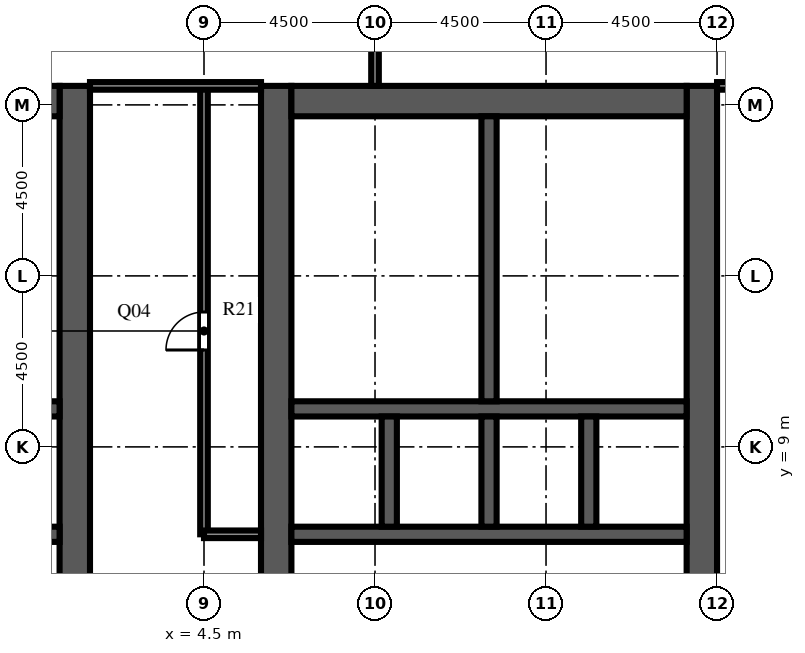
"""IFC4 building model, lengths in metres.
Left out: names, types, materials, properties, quantities, classifications, styles, units other than length and angle.
Written with IfcOpenShell. Run it as: python <this file> out.ifc"""

import sys

from ifc_helpers import new_model, si_unit, direction, frame, frame_2d, origin, place, context, subcontext, project, spatial, rectangle, extrude, element, fill, save


model = new_model("IFC4")
c1 = context("Model", 3, precision=1e-05, world=origin(), true_north=direction((0.0, 1.0)))
c2 = subcontext(c1, "Body", "Model", "MODEL_VIEW")
j1 = project(units=[si_unit("LENGTHUNIT", "METRE"), si_unit("PLANEANGLEUNIT", "RADIAN")], contexts=[c1])
p1 = place(None, origin())
s1 = spatial("IfcSite", under=j1, at=p1, CompositionType="ELEMENT")
p2 = place(p1, origin())
s2 = spatial("IfcBuilding", under=s1, at=p2, CompositionType="ELEMENT")
p3 = place(p2, frame((0.0, 0.0, 220.2)))
s3 = spatial("IfcBuildingStorey", under=s2, at=p3, CompositionType="ELEMENT", Elevation=220.2)
p4 = place(p3, frame((1.1, -9.0, 0.0), z_axis=(0.0, 0.0, 1.0), x_axis=(0.0, 1.0, 0.0)))
e1 = element("IfcWall", 1, at=p4, inside=s3, PredefinedType="SHEAR", context=c2, shape_type="SweptSolid", body=[
    extrude(rectangle(XDim=27.5, YDim=0.8, at=frame_2d((13.75, 0.0))), origin(), (0.0, 0.0, 1.0), 6.0),
])
p5 = place(p4, frame((12.55, 0.0, 0.0)))
e2 = element("IfcOpeningElement", 2, at=p5, cuts=e1, PredefinedType="OPENING", context=c2, shape_type="SweptSolid", body=[
    extrude(rectangle(XDim=2.4, YDim=2.4, at=frame_2d((1.2, 1.2))), frame((0.0, 0.41, 0.0), z_axis=(0.0, -1.0, 0.0), x_axis=(1.0, 0.0, 0.0)), (0.0, 0.0, 1.0), 0.82),
])
p6 = place(p4, frame((5.5, 0.0, 0.0)))
e3 = element("IfcOpeningElement", 3, at=p6, cuts=e1, PredefinedType="OPENING", context=c2, shape_type="SweptSolid", body=[
    extrude(rectangle(XDim=0.95, YDim=2.1, at=frame_2d((0.475, 1.05))), frame((0.0, 0.41, 0.0), z_axis=(0.0, -1.0, 0.0), x_axis=(1.0, 0.0, 0.0)), (0.0, 0.0, 1.0), 0.82),
])
p7 = place(p4, frame((23.475, 0.0, 0.0)))
e4 = element("IfcOpeningElement", 4, at=p7, cuts=e1, PredefinedType="OPENING", context=c2, shape_type="SweptSolid", body=[
    extrude(rectangle(XDim=1.2, YDim=2.1, at=frame_2d((0.6, 1.05))), frame((0.0, 0.41, 0.0), z_axis=(0.0, -1.0, 0.0), x_axis=(1.0, 0.0, 0.0)), (0.0, 0.0, 1.0), 0.82),
])
p8 = place(p3, frame((-9.7, 18.1, 0.0), z_axis=(0.0, 0.0, 1.0), x_axis=(1.0, 0.0, 0.0)))
e5 = element("IfcWall", 5, at=p8, inside=s3, PredefinedType="SHEAR", context=c2, shape_type="SweptSolid", body=[
    extrude(rectangle(XDim=10.4, YDim=0.8, at=frame_2d((5.2, 0.0))), origin(), (0.0, 0.0, 1.0), 6.0),
])
p9 = place(p3, frame((-9.7, 6.7, 0.0), z_axis=(0.0, 0.0, 1.0), x_axis=(1.0, 0.0, 0.0)))
e6 = element("IfcWall", 6, at=p9, inside=s3, PredefinedType="SHEAR", context=c2, shape_type="SweptSolid", body=[
    extrude(rectangle(XDim=10.4, YDim=0.4, at=frame_2d((5.2, 0.0))), origin(), (0.0, 0.0, 1.0), 6.0),
])
p10 = place(p9, frame((3.337, 0.0, 0.0)))
e7 = element("IfcOpeningElement", 7, at=p10, cuts=e6, PredefinedType="OPENING", context=c2, shape_type="SweptSolid", body=[
    extrude(rectangle(XDim=1.1, YDim=2.1, at=frame_2d((0.55, 1.05))), frame((0.0, 0.21, 0.0), z_axis=(0.0, -1.0, 0.0), x_axis=(1.0, 0.0, 0.0)), (0.0, 0.0, 1.0), 0.42),
])
p11 = place(p9, frame((5.962, 0.0, 0.0)))
e8 = element("IfcOpeningElement", 8, at=p11, cuts=e6, PredefinedType="OPENING", context=c2, shape_type="SweptSolid", body=[
    extrude(rectangle(XDim=1.1, YDim=2.1, at=frame_2d((0.55, 1.05))), frame((0.0, 0.21, 0.0), z_axis=(0.0, -1.0, 0.0), x_axis=(1.0, 0.0, 0.0)), (0.0, 0.0, 1.0), 0.42),
])
p12 = place(p9, frame((8.663, 0.0, 0.0)))
e9 = element("IfcOpeningElement", 9, at=p12, cuts=e6, PredefinedType="OPENING", context=c2, shape_type="SweptSolid", body=[
    extrude(rectangle(XDim=1.1, YDim=2.1, at=frame_2d((0.55, 1.05))), frame((0.0, 0.21, 0.0), z_axis=(0.0, -1.0, 0.0), x_axis=(1.0, 0.0, 0.0)), (0.0, 0.0, 1.0), 0.42),
])
p13 = place(p9, frame((0.688, 0.0, 0.0)))
e10 = element("IfcOpeningElement", 10, at=p13, cuts=e6, PredefinedType="OPENING", context=c2, shape_type="SweptSolid", body=[
    extrude(rectangle(XDim=1.0, YDim=2.1, at=frame_2d((0.5, 1.05))), frame((0.0, 0.21, 0.0), z_axis=(0.0, -1.0, 0.0), x_axis=(1.0, 0.0, 0.0)), (0.0, 0.0, 1.0), 0.42),
])
p14 = place(p3, frame((-9.7, 10.0, 0.0), z_axis=(0.0, 0.0, 1.0), x_axis=(1.0, 0.0, 0.0)))
e11 = element("IfcWall", 11, at=p14, inside=s3, PredefinedType="SHEAR", context=c2, shape_type="SweptSolid", body=[
    extrude(rectangle(XDim=10.4, YDim=0.4, at=frame_2d((5.2, 0.0))), origin(), (0.0, 0.0, 1.0), 6.0),
])
p15 = place(p3, frame((6.4, -9.0, 0.0), z_axis=(0.0, 0.0, 1.0), x_axis=(0.0, 1.0, 0.0)))
e12 = element("IfcWall", 12, at=p15, inside=s3, PredefinedType="SHEAR", context=c2, shape_type="SweptSolid", body=[
    extrude(rectangle(XDim=27.5, YDim=0.8, at=frame_2d((13.75, 0.0))), origin(), (0.0, 0.0, 1.0), 6.0),
])
p16 = place(p15, frame((12.55, 0.0, 0.0)))
e13 = element("IfcOpeningElement", 13, at=p16, cuts=e12, PredefinedType="OPENING", context=c2, shape_type="SweptSolid", body=[
    extrude(rectangle(XDim=2.4, YDim=2.4, at=frame_2d((1.2, 1.2))), frame((0.0, 0.41, 0.0), z_axis=(0.0, -1.0, 0.0), x_axis=(1.0, 0.0, 0.0)), (0.0, 0.0, 1.0), 0.82),
])
p17 = place(p15, frame((5.5, 0.0, 0.0)))
e14 = element("IfcOpeningElement", 14, at=p17, cuts=e12, PredefinedType="OPENING", context=c2, shape_type="SweptSolid", body=[
    extrude(rectangle(XDim=0.95, YDim=2.1, at=frame_2d((0.475, 1.05))), frame((0.0, 0.41, 0.0), z_axis=(0.0, -1.0, 0.0), x_axis=(1.0, 0.0, 0.0)), (0.0, 0.0, 1.0), 0.82),
])
p18 = place(p15, frame((23.475, 0.0, 0.0)))
e15 = element("IfcOpeningElement", 15, at=p18, cuts=e12, PredefinedType="OPENING", context=c2, shape_type="SweptSolid", body=[
    extrude(rectangle(XDim=1.2, YDim=2.1, at=frame_2d((0.6, 1.05))), frame((0.0, 0.41, 0.0), z_axis=(0.0, -1.0, 0.0), x_axis=(1.0, 0.0, 0.0)), (0.0, 0.0, 1.0), 0.82),
])
p19 = place(p3, frame((17.6, -9.0, 0.0), z_axis=(0.0, 0.0, 1.0), x_axis=(0.0, 1.0, 0.0)))
e16 = element("IfcWall", 16, at=p19, inside=s3, PredefinedType="SHEAR", context=c2, shape_type="SweptSolid", body=[
    extrude(rectangle(XDim=27.5, YDim=0.8, at=frame_2d((13.75, 0.0))), origin(), (0.0, 0.0, 1.0), 6.0),
])
p20 = place(p19, frame((12.55, 0.0, 0.0)))
e17 = element("IfcOpeningElement", 17, at=p20, cuts=e16, PredefinedType="OPENING", context=c2, shape_type="SweptSolid", body=[
    extrude(rectangle(XDim=2.4, YDim=2.4, at=frame_2d((1.2, 1.2))), frame((0.0, 0.41, 0.0), z_axis=(0.0, -1.0, 0.0), x_axis=(1.0, 0.0, 0.0)), (0.0, 0.0, 1.0), 0.82),
])
p21 = place(p19, frame((6.825, 0.0, 0.0)))
e18 = element("IfcOpeningElement", 18, at=p21, cuts=e16, PredefinedType="OPENING", context=c2, shape_type="SweptSolid", body=[
    extrude(rectangle(XDim=1.2, YDim=2.1, at=frame_2d((0.6, 1.05))), frame((0.0, 0.41, 0.0), z_axis=(0.0, -1.0, 0.0), x_axis=(1.0, 0.0, 0.0)), (0.0, 0.0, 1.0), 0.82),
])
p22 = place(p19, frame((19.475, 0.0, 0.0)))
e19 = element("IfcOpeningElement", 19, at=p22, cuts=e16, PredefinedType="OPENING", context=c2, shape_type="SweptSolid", body=[
    extrude(rectangle(XDim=1.2, YDim=2.1, at=frame_2d((0.6, 1.05))), frame((0.0, 0.41, 0.0), z_axis=(0.0, -1.0, 0.0), x_axis=(1.0, 0.0, 0.0)), (0.0, 0.0, 1.0), 0.82),
])
p23 = place(p3, frame((6.8, 18.1, 0.0), z_axis=(0.0, 0.0, 1.0), x_axis=(1.0, 0.0, 0.0)))
e20 = element("IfcWall", 20, at=p23, inside=s3, PredefinedType="SHEAR", context=c2, shape_type="SweptSolid", body=[
    extrude(rectangle(XDim=10.4, YDim=0.8, at=frame_2d((5.2, 0.0))), origin(), (0.0, 0.0, 1.0), 6.0),
])
p24 = place(p3, frame((6.8, 6.7, 0.0), z_axis=(0.0, 0.0, 1.0), x_axis=(1.0, 0.0, 0.0)))
e21 = element("IfcWall", 21, at=p24, inside=s3, PredefinedType="SHEAR", context=c2, shape_type="SweptSolid", body=[
    extrude(rectangle(XDim=10.4, YDim=0.4, at=frame_2d((5.2, 0.0))), origin(), (0.0, 0.0, 1.0), 6.0),
])
p25 = place(p24, frame((3.337, 0.0, 0.0)))
e22 = element("IfcOpeningElement", 22, at=p25, cuts=e21, PredefinedType="OPENING", context=c2, shape_type="SweptSolid", body=[
    extrude(rectangle(XDim=1.1, YDim=2.1, at=frame_2d((0.55, 1.05))), frame((0.0, 0.21, 0.0), z_axis=(0.0, -1.0, 0.0), x_axis=(1.0, 0.0, 0.0)), (0.0, 0.0, 1.0), 0.42),
])
p26 = place(p24, frame((5.962, 0.0, 0.0)))
e23 = element("IfcOpeningElement", 23, at=p26, cuts=e21, PredefinedType="OPENING", context=c2, shape_type="SweptSolid", body=[
    extrude(rectangle(XDim=1.1, YDim=2.1, at=frame_2d((0.55, 1.05))), frame((0.0, 0.21, 0.0), z_axis=(0.0, -1.0, 0.0), x_axis=(1.0, 0.0, 0.0)), (0.0, 0.0, 1.0), 0.42),
])
p27 = place(p24, frame((8.663, 0.0, 0.0)))
e24 = element("IfcOpeningElement", 24, at=p27, cuts=e21, PredefinedType="OPENING", context=c2, shape_type="SweptSolid", body=[
    extrude(rectangle(XDim=1.1, YDim=2.1, at=frame_2d((0.55, 1.05))), frame((0.0, 0.21, 0.0), z_axis=(0.0, -1.0, 0.0), x_axis=(1.0, 0.0, 0.0)), (0.0, 0.0, 1.0), 0.42),
])
p28 = place(p24, frame((0.688, 0.0, 0.0)))
e25 = element("IfcOpeningElement", 25, at=p28, cuts=e21, PredefinedType="OPENING", context=c2, shape_type="SweptSolid", body=[
    extrude(rectangle(XDim=1.0, YDim=2.1, at=frame_2d((0.5, 1.05))), frame((0.0, 0.21, 0.0), z_axis=(0.0, -1.0, 0.0), x_axis=(1.0, 0.0, 0.0)), (0.0, 0.0, 1.0), 0.42),
])
p29 = place(p3, frame((6.8, 10.0, 0.0), z_axis=(0.0, 0.0, 1.0), x_axis=(1.0, 0.0, 0.0)))
e26 = element("IfcWall", 26, at=p29, inside=s3, PredefinedType="SHEAR", context=c2, shape_type="SweptSolid", body=[
    extrude(rectangle(XDim=10.4, YDim=0.4, at=frame_2d((5.2, 0.0))), origin(), (0.0, 0.0, 1.0), 6.0),
])
for number, where, z_axis, x_axis in (
    (27, (9.375, 6.9, 0.0), (0.0, 0.0, 1.0), (0.0, 1.0, 0.0)),
    (28, (12.0, 6.9, 0.0), (0.0, 0.0, 1.0), (0.0, 1.0, 0.0)),
    (29, (14.625, 6.9, 0.0), (0.0, 0.0, 1.0), (0.0, 1.0, 0.0)),
):
    element("IfcWall", number, at=place(p3, frame(where, z_axis=z_axis, x_axis=x_axis)), inside=s3, PredefinedType="SHEAR", context=c2, shape_type="SweptSolid", body=[
        extrude(rectangle(XDim=2.9, YDim=0.4, at=frame_2d((1.45, 0.0))), origin(), (0.0, 0.0, 1.0), 6.0),
    ])
p30 = place(p3, frame((12.0, 10.2, 0.0), z_axis=(0.0, 0.0, 1.0), x_axis=(0.0, 1.0, 0.0)))
e30 = element("IfcWall", 30, at=p30, inside=s3, PredefinedType="SHEAR", context=c2, shape_type="SweptSolid", body=[
    extrude(rectangle(XDim=7.5, YDim=0.4, at=frame_2d((3.75, 0.0))), origin(), (0.0, 0.0, 1.0), 6.0),
])
p31 = place(p3, frame((-0.6, 12.45, 0.0), z_axis=(0.0, 0.0, 1.0), x_axis=(1.0, 0.0, 0.0)))
e31 = element("IfcWall", 31, at=p31, inside=s3, PredefinedType="PARTITIONING", context=c2, shape_type="SweptSolid", body=[
    extrude(rectangle(XDim=1.3, YDim=0.1, at=frame_2d((0.65, 0.0))), origin(), (0.0, 0.0, 1.0), 5.4),
])
p32 = place(p31, frame((0.2, 0.0, 0.0)))
e32 = element("IfcOpeningElement", 32, at=p32, cuts=e31, PredefinedType="OPENING", context=c2, shape_type="SweptSolid", body=[
    extrude(rectangle(XDim=0.9, YDim=2.1, at=frame_2d((0.45, 1.05))), frame((0.0, 0.06, 0.0), z_axis=(0.0, -1.0, 0.0), x_axis=(1.0, 0.0, 0.0)), (0.0, 0.0, 1.0), 0.12),
])
p33 = place(p3, frame((6.8, 12.45, 0.0), z_axis=(0.0, 0.0, 1.0), x_axis=(1.0, 0.0, 0.0)))
e33 = element("IfcWall", 33, at=p33, inside=s3, PredefinedType="PARTITIONING", context=c2, shape_type="SweptSolid", body=[
    extrude(rectangle(XDim=1.3, YDim=0.1, at=frame_2d((0.65, 0.0))), origin(), (0.0, 0.0, 1.0), 5.4),
])
p34 = place(p33, frame((0.2, 0.0, 0.0)))
e34 = element("IfcOpeningElement", 34, at=p34, cuts=e33, PredefinedType="OPENING", context=c2, shape_type="SweptSolid", body=[
    extrude(rectangle(XDim=0.9, YDim=2.1, at=frame_2d((0.45, 1.05))), frame((0.0, 0.06, 0.0), z_axis=(0.0, -1.0, 0.0), x_axis=(1.0, 0.0, 0.0)), (0.0, 0.0, 1.0), 0.12),
])
p35 = place(p3, frame((8.1, 12.45, 0.0), z_axis=(0.0, 0.0, 1.0), x_axis=(1.0, 0.0, 0.0)))
e35 = element("IfcWall", 35, at=p35, inside=s3, PredefinedType="PARTITIONING", context=c2, shape_type="SweptSolid", body=[
    extrude(rectangle(XDim=3.7, YDim=0.1, at=frame_2d((1.85, 0.0))), origin(), (0.0, 0.0, 1.0), 5.4),
])
p36 = place(p3, frame((8.1, 12.45, 0.0), z_axis=(0.0, 0.0, 1.0), x_axis=(0.0, 1.0, 0.0)))
e36 = element("IfcWall", 36, at=p36, inside=s3, PredefinedType="PARTITIONING", context=c2, shape_type="SweptSolid", body=[
    extrude(rectangle(XDim=2.625, YDim=0.1, at=frame_2d((1.312, 0.0))), origin(), (0.0, 0.0, 1.0), 5.4),
])
p37 = place(p36, frame((0.812, 0.0, 0.0)))
e37 = element("IfcOpeningElement", 37, at=p37, cuts=e36, PredefinedType="OPENING", context=c2, shape_type="SweptSolid", body=[
    extrude(rectangle(XDim=1.0, YDim=2.1, at=frame_2d((0.5, 1.05))), frame((0.0, 0.06, 0.0), z_axis=(0.0, -1.0, 0.0), x_axis=(1.0, 0.0, 0.0)), (0.0, 0.0, 1.0), 0.12),
])
p38 = place(p3, frame((8.1, 15.075, 0.0), z_axis=(0.0, 0.0, 1.0), x_axis=(0.0, 1.0, 0.0)))
e38 = element("IfcWall", 38, at=p38, inside=s3, PredefinedType="PARTITIONING", context=c2, shape_type="SweptSolid", body=[
    extrude(rectangle(XDim=2.625, YDim=0.1, at=frame_2d((1.312, 0.0))), origin(), (0.0, 0.0, 1.0), 5.4),
])
p39 = place(p38, frame((0.812, 0.0, 0.0)))
e39 = element("IfcOpeningElement", 39, at=p39, cuts=e38, PredefinedType="OPENING", context=c2, shape_type="SweptSolid", body=[
    extrude(rectangle(XDim=1.0, YDim=2.1, at=frame_2d((0.5, 1.05))), frame((0.0, 0.06, 0.0), z_axis=(0.0, -1.0, 0.0), x_axis=(1.0, 0.0, 0.0)), (0.0, 0.0, 1.0), 0.12),
])
p40 = place(p3, frame((8.1, 15.075, 0.0), z_axis=(0.0, 0.0, 1.0), x_axis=(1.0, 0.0, 0.0)))
e40 = element("IfcWall", 40, at=p40, inside=s3, PredefinedType="PARTITIONING", context=c2, shape_type="SweptSolid", body=[
    extrude(rectangle(XDim=3.7, YDim=0.1, at=frame_2d((1.85, 0.0))), origin(), (0.0, 0.0, 1.0), 5.4),
])
p41 = place(p3, frame((4.5, 18.5, 0.0), z_axis=(0.0, 0.0, 1.0), x_axis=(0.0, -1.0, 0.0)))
e41 = element("IfcWall", 41, at=p41, inside=s3, PredefinedType="PARTITIONING", context=c2, shape_type="SweptSolid", body=[
    extrude(rectangle(XDim=11.8, YDim=0.2, at=frame_2d((5.9, 0.0))), origin(), (0.0, 0.0, 1.0), 5.4),
])
p42 = place(p41, frame((5.95, 0.0, 0.0)))
e42 = element("IfcOpeningElement", 42, at=p42, cuts=e41, PredefinedType="OPENING", context=c2, shape_type="SweptSolid", body=[
    extrude(rectangle(XDim=1.0, YDim=2.1, at=frame_2d((0.5, 1.05))), frame((0.0, 0.11, 0.0), z_axis=(0.0, -1.0, 0.0), x_axis=(1.0, 0.0, 0.0)), (0.0, 0.0, 1.0), 0.22),
])
p43 = place(p3, frame((9.0, 18.5, 0.0), z_axis=(0.0, 0.0, 1.0), x_axis=(0.0, 1.0, 0.0)))
e43 = element("IfcWall", 43, at=p43, inside=s3, PredefinedType="PARTITIONING", context=c2, shape_type="SweptSolid", body=[
    extrude(rectangle(XDim=3.4, YDim=0.2, at=frame_2d((1.7, 0.0))), origin(), (0.0, 0.0, 1.0), 5.4),
])
p44 = place(p3, frame((4.5, 6.7, 0.0), z_axis=(0.0, 0.0, 1.0), x_axis=(1.0, 0.0, 0.0)))
e44 = element("IfcWall", 44, at=p44, inside=s3, PredefinedType="PARTITIONING", context=c2, shape_type="SweptSolid", body=[
    extrude(rectangle(XDim=1.5, YDim=0.2, at=frame_2d((0.75, 0.0))), origin(), (0.0, 0.0, 1.0), 5.4),
])
p45 = place(p3, frame((1.5, 18.5, 0.0), z_axis=(0.0, 0.0, 1.0), x_axis=(1.0, 0.0, 0.0)))
e45 = element("IfcWall", 45, at=p45, inside=s3, PredefinedType="PARTITIONING", context=c2, shape_type="SweptSolid", body=[
    extrude(rectangle(XDim=4.5, YDim=0.2, at=frame_2d((2.25, 0.0))), origin(), (0.0, 0.0, 1.0), 5.4),
])
p46 = place(p3, frame((18.0, 18.5, 0.0), z_axis=(0.0, 0.0, 1.0), x_axis=(1.0, 0.0, 0.0)))
e46 = element("IfcWall", 46, at=p46, inside=s3, PredefinedType="PARTITIONING", context=c2, shape_type="SweptSolid", body=[
    extrude(rectangle(XDim=3.0, YDim=0.2, at=frame_2d((1.5, 0.0))), origin(), (0.0, 0.0, 1.0), 5.4),
])
p47 = place(p46, frame((1.35, 0.0, 0.0)))
e47 = element("IfcOpeningElement", 47, at=p47, cuts=e46, PredefinedType="OPENING", context=c2, shape_type="SweptSolid", body=[
    extrude(rectangle(XDim=1.0, YDim=2.1, at=frame_2d((0.5, 1.05))), frame((0.0, 0.11, 0.0), z_axis=(0.0, -1.0, 0.0), x_axis=(1.0, 0.0, 0.0)), (0.0, 0.0, 1.0), 0.22),
])
p48 = place(p25, origin())
e48 = element("IfcDoor", 48, at=p48, inside=s3, OperationType="DOUBLE_DOOR_SLIDING", PredefinedType="DOOR", context=c2, shape_type="SweptSolid", body=[
    extrude(rectangle(XDim=1.1, YDim=2.1, at=frame_2d((0.55, 1.05))), frame((0.0, 0.025, 0.0), z_axis=(0.0, -1.0, 0.0), x_axis=(1.0, 0.0, 0.0)), (0.0, 0.0, 1.0), 0.05),
])
fill(e22, e48)
p49 = place(p26, origin())
e49 = element("IfcDoor", 49, at=p49, inside=s3, OperationType="DOUBLE_DOOR_SLIDING", PredefinedType="DOOR", context=c2, shape_type="SweptSolid", body=[
    extrude(rectangle(XDim=1.1, YDim=2.1, at=frame_2d((0.55, 1.05))), frame((0.0, 0.025, 0.0), z_axis=(0.0, -1.0, 0.0), x_axis=(1.0, 0.0, 0.0)), (0.0, 0.0, 1.0), 0.05),
])
fill(e23, e49)
p50 = place(p27, origin())
e50 = element("IfcDoor", 50, at=p50, inside=s3, OperationType="DOUBLE_DOOR_SLIDING", PredefinedType="DOOR", context=c2, shape_type="SweptSolid", body=[
    extrude(rectangle(XDim=1.1, YDim=2.1, at=frame_2d((0.55, 1.05))), frame((0.0, 0.025, 0.0), z_axis=(0.0, -1.0, 0.0), x_axis=(1.0, 0.0, 0.0)), (0.0, 0.0, 1.0), 0.05),
])
fill(e24, e50)
p51 = place(p5, origin())
e51 = element("IfcDoor", 51, at=p51, inside=s3, OperationType="DOUBLE_DOOR_DOUBLE_SWING", PredefinedType="DOOR", context=c2, shape_type="SweptSolid", body=[
    extrude(rectangle(XDim=2.4, YDim=2.4, at=frame_2d((1.2, 1.2))), frame((0.0, 0.025, 0.0), z_axis=(0.0, -1.0, 0.0), x_axis=(1.0, 0.0, 0.0)), (0.0, 0.0, 1.0), 0.05),
])
fill(e2, e51)
p52 = place(p16, origin())
e52 = element("IfcDoor", 52, at=p52, inside=s3, OperationType="DOUBLE_DOOR_DOUBLE_SWING", PredefinedType="DOOR", context=c2, shape_type="SweptSolid", body=[
    extrude(rectangle(XDim=2.4, YDim=2.4, at=frame_2d((1.2, 1.2))), frame((0.0, 0.025, 0.0), z_axis=(0.0, -1.0, 0.0), x_axis=(1.0, 0.0, 0.0)), (0.0, 0.0, 1.0), 0.05),
])
fill(e13, e52)
p53 = place(p20, origin())
e53 = element("IfcDoor", 53, at=p53, inside=s3, OperationType="DOUBLE_DOOR_DOUBLE_SWING", PredefinedType="DOOR", context=c2, shape_type="SweptSolid", body=[
    extrude(rectangle(XDim=2.4, YDim=2.4, at=frame_2d((1.2, 1.2))), frame((0.0, 0.025, 0.0), z_axis=(0.0, -1.0, 0.0), x_axis=(1.0, 0.0, 0.0)), (0.0, 0.0, 1.0), 0.05),
])
fill(e17, e53)
p54 = place(p22, frame((1.2, 0.0, 0.0), z_axis=(0.0, 0.0, 1.0), x_axis=(-1.0, 0.0, 0.0)))
e54 = element("IfcDoor", 54, at=p54, inside=s3, OperationType="SINGLE_SWING_LEFT", PredefinedType="DOOR", context=c2, shape_type="SweptSolid", body=[
    extrude(rectangle(XDim=1.2, YDim=2.1, at=frame_2d((0.6, 1.05))), frame((0.0, 0.025, 0.0), z_axis=(0.0, -1.0, 0.0), x_axis=(1.0, 0.0, 0.0)), (0.0, 0.0, 1.0), 0.05),
])
fill(e19, e54)
p55 = place(p7, origin())
e55 = element("IfcDoor", 55, at=p55, inside=s3, OperationType="SINGLE_SWING_RIGHT", PredefinedType="DOOR", context=c2, shape_type="SweptSolid", body=[
    extrude(rectangle(XDim=1.2, YDim=2.1, at=frame_2d((0.6, 1.05))), frame((0.0, 0.375, 0.0), z_axis=(0.0, -1.0, 0.0), x_axis=(1.0, 0.0, 0.0)), (0.0, 0.0, 1.0), 0.05),
])
fill(e4, e55)
p56 = place(p28, origin())
e56 = element("IfcDoor", 56, at=p56, inside=s3, OperationType="SINGLE_SWING_LEFT", PredefinedType="DOOR", context=c2, shape_type="SweptSolid", body=[
    extrude(rectangle(XDim=1.0, YDim=2.1, at=frame_2d((0.5, 1.05))), frame((0.0, 0.025, 0.0), z_axis=(0.0, -1.0, 0.0), x_axis=(1.0, 0.0, 0.0)), (0.0, 0.0, 1.0), 0.05),
])
fill(e25, e56)
p57 = place(p34, origin())
e57 = element("IfcDoor", 57, at=p57, inside=s3, OperationType="SINGLE_SWING_RIGHT", PredefinedType="DOOR", context=c2, shape_type="SweptSolid", body=[
    extrude(rectangle(XDim=0.9, YDim=2.1, at=frame_2d((0.45, 1.05))), frame((0.0, 0.025, 0.0), z_axis=(0.0, -1.0, 0.0), x_axis=(1.0, 0.0, 0.0)), (0.0, 0.0, 1.0), 0.05),
])
fill(e34, e57)
p58 = place(p18, origin())
e58 = element("IfcDoor", 58, at=p58, inside=s3, OperationType="SINGLE_SWING_LEFT", PredefinedType="DOOR", context=c2, shape_type="SweptSolid", body=[
    extrude(rectangle(XDim=1.2, YDim=2.1, at=frame_2d((0.6, 1.05))), frame((0.0, -0.325, 0.0), z_axis=(0.0, -1.0, 0.0), x_axis=(1.0, 0.0, 0.0)), (0.0, 0.0, 1.0), 0.05),
])
fill(e15, e58)
p59 = place(p37, origin())
e59 = element("IfcDoor", 59, at=p59, inside=s3, OperationType="SINGLE_SWING_RIGHT", PredefinedType="DOOR", context=c2, shape_type="SweptSolid", body=[
    extrude(rectangle(XDim=1.0, YDim=2.1, at=frame_2d((0.5, 1.05))), frame((0.0, 0.025, 0.0), z_axis=(0.0, -1.0, 0.0), x_axis=(1.0, 0.0, 0.0)), (0.0, 0.0, 1.0), 0.05),
])
fill(e37, e59)
p60 = place(p39, origin())
e60 = element("IfcDoor", 60, at=p60, inside=s3, OperationType="SINGLE_SWING_LEFT", PredefinedType="DOOR", context=c2, shape_type="SweptSolid", body=[
    extrude(rectangle(XDim=1.0, YDim=2.1, at=frame_2d((0.5, 1.05))), frame((0.0, 0.025, 0.0), z_axis=(0.0, -1.0, 0.0), x_axis=(1.0, 0.0, 0.0)), (0.0, 0.0, 1.0), 0.05),
])
fill(e39, e60)
p61 = place(p42, origin())
e61 = element("IfcDoor", 61, at=p61, inside=s3, OperationType="SINGLE_SWING_RIGHT", PredefinedType="DOOR", context=c2, shape_type="SweptSolid", body=[
    extrude(rectangle(XDim=1.0, YDim=2.1, at=frame_2d((0.5, 1.05))), frame((0.0, 0.025, 0.0), z_axis=(0.0, -1.0, 0.0), x_axis=(1.0, 0.0, 0.0)), (0.0, 0.0, 1.0), 0.05),
])
fill(e42, e61)
save(model, sys.argv[1])
